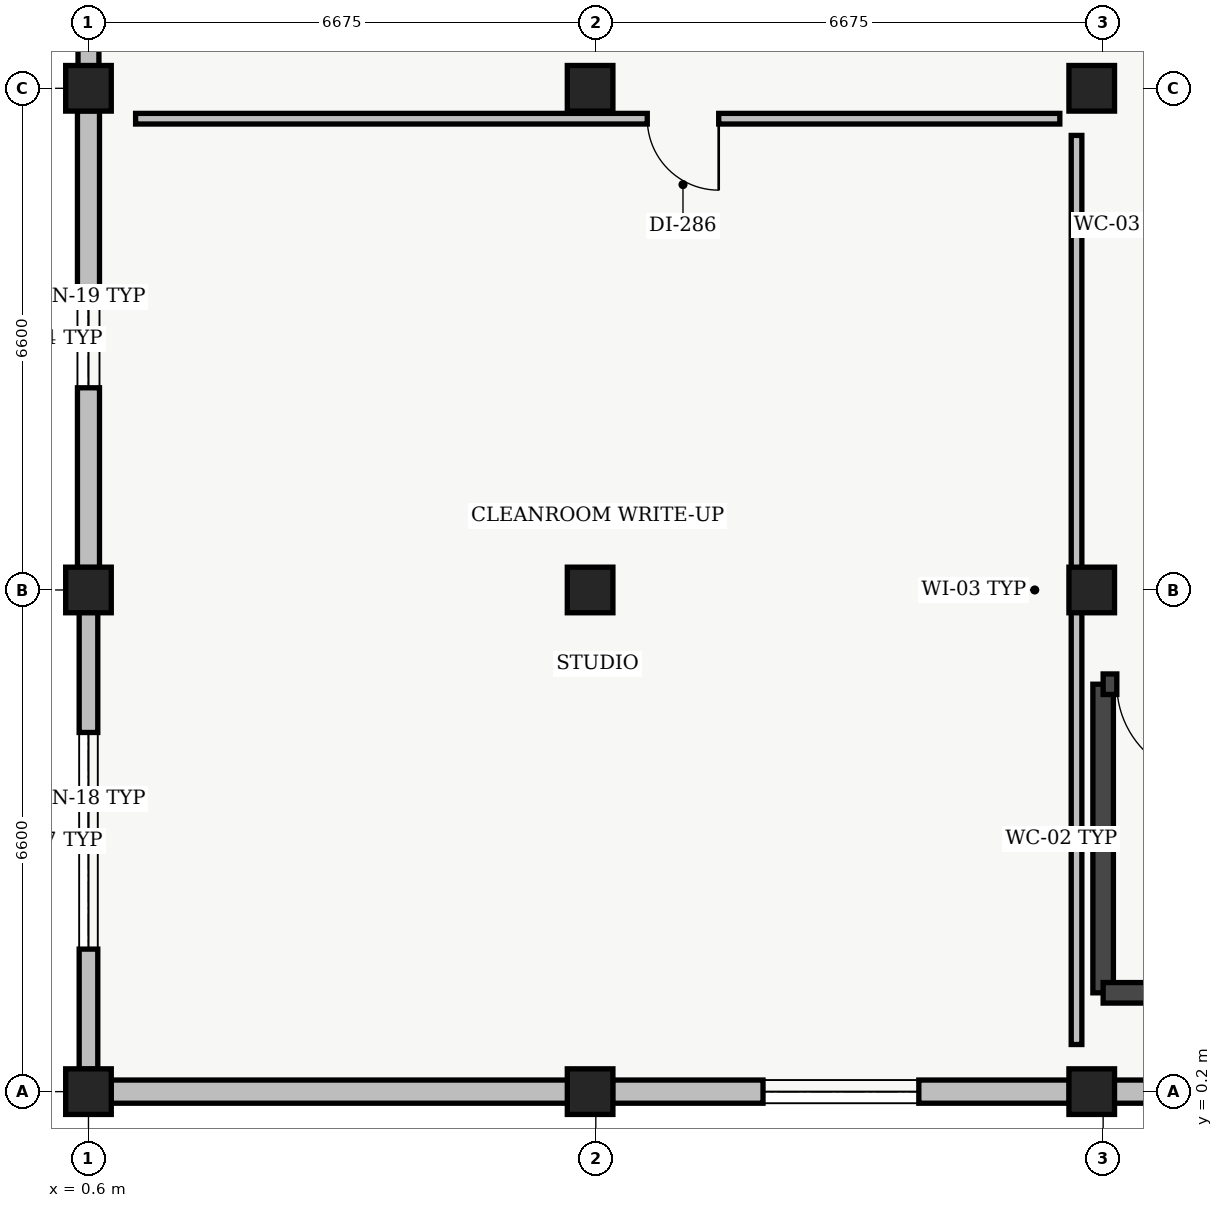
"""IFC4 building model, lengths in metres.
Left out: names, types, materials, properties, quantities, classifications, styles, units other than length and angle.
Written with IfcOpenShell. Run it as: python <this file> out.ifc"""

import sys

from ifc_helpers import new_model, si_unit, direction, frame, frame_2d, origin, origin_2d, place, context, subcontext, project, spatial, rectangle, extrude, element, fill, save


model = new_model("IFC4")
c1 = context("Model", 3, precision=1e-05, world=origin(), true_north=direction((0.0, 1.0)))
c2 = subcontext(c1, "Body", "Model", "MODEL_VIEW")
j1 = project(units=[si_unit("LENGTHUNIT", "METRE"), si_unit("PLANEANGLEUNIT", "RADIAN")], contexts=[c1])
p1 = place(None, origin())
s1 = spatial("IfcSite", under=j1, at=p1, CompositionType="ELEMENT")
p2 = place(p1, origin())
s2 = spatial("IfcBuilding", under=s1, at=p2, CompositionType="ELEMENT")
p3 = place(p2, frame((0.0, 0.0, 9.6)))
s3 = spatial("IfcBuildingStorey", under=s2, at=p3, CompositionType="ELEMENT", Elevation=9.6)
for number, where, z_axis, x_axis in (
    (1, (0.6, 0.2, 0.0), (0.0, 0.0, 1.0), (1.0, 0.0, 0.0)),
    (2, (0.6, 6.8, 0.0), (0.0, 0.0, 1.0), (1.0, 0.0, 0.0)),
    (3, (0.6, 13.4, 0.0), (0.0, 0.0, 1.0), (1.0, 0.0, 0.0)),
    (4, (7.2, 0.2, 0.0), (0.0, 0.0, 1.0), (1.0, 0.0, 0.0)),
    (5, (7.2, 6.8, 0.0), (0.0, 0.0, 1.0), (1.0, 0.0, 0.0)),
    (6, (7.2, 13.4, 0.0), (0.0, 0.0, 1.0), (1.0, 0.0, 0.0)),
    (7, (13.8, 0.2, 0.0), (0.0, 0.0, 1.0), (1.0, 0.0, 0.0)),
    (8, (13.8, 6.8, 0.0), (0.0, 0.0, 1.0), (1.0, 0.0, 0.0)),
    (9, (13.8, 13.4, 0.0), (0.0, 0.0, 1.0), (1.0, 0.0, 0.0)),
):
    element("IfcColumn", number, at=place(p3, frame(where, z_axis=z_axis, x_axis=x_axis)), inside=s3, PredefinedType="COLUMN", context=c2, shape_type="SweptSolid", body=[
        extrude(rectangle(XDim=0.6, YDim=0.6, at=origin_2d()), origin(), (0.0, 0.0, 1.0), 4.28),
    ])
p4 = place(p3, frame((0.6, 0.495, 0.0), z_axis=(0.0, 0.0, 1.0), x_axis=(0.0, 1.0, 0.0)))
e10 = element("IfcWall", 10, at=p4, inside=s3, PredefinedType="STANDARD", context=c2, shape_type="SweptSolid", body=[
    extrude(rectangle(XDim=6.01, YDim=0.245, at=frame_2d((3.005, 0.0))), origin(), (0.0, 0.0, 1.0), 3.815),
])
p5 = place(p4, frame((1.58, 0.0, 0.95)))
e11 = element("IfcOpeningElement", 11, at=p5, cuts=e10, PredefinedType="OPENING", context=c2, shape_type="SweptSolid", body=[
    extrude(rectangle(XDim=2.85, YDim=1.5, at=frame_2d((1.425, 0.75))), frame((0.0, 0.123, 0.0), z_axis=(0.0, -1.0, 0.0), x_axis=(1.0, 0.0, 0.0)), (0.0, 0.0, 1.0), 0.245),
])
p6 = place(p3, frame((0.6, 7.095, 0.0), z_axis=(0.0, 0.0, 1.0), x_axis=(0.0, 1.0, 0.0)))
e12 = element("IfcWall", 12, at=p6, inside=s3, PredefinedType="STANDARD", context=c2, shape_type="SweptSolid", body=[
    extrude(rectangle(XDim=6.01, YDim=0.29, at=frame_2d((3.005, 0.0))), origin(), (0.0, 0.0, 1.0), 3.815),
])
p7 = place(p6, frame((2.365, 0.0, 0.95)))
e13 = element("IfcOpeningElement", 13, at=p7, cuts=e12, PredefinedType="OPENING", context=c2, shape_type="SweptSolid", body=[
    extrude(rectangle(XDim=1.28, YDim=1.42, at=frame_2d((0.64, 0.71))), frame((0.0, 0.145, 0.0), z_axis=(0.0, -1.0, 0.0), x_axis=(1.0, 0.0, 0.0)), (0.0, 0.0, 1.0), 0.29),
])
p8 = place(p3, frame((0.6, 13.695, 0.0), z_axis=(0.0, 0.0, 1.0), x_axis=(0.0, 1.0, 0.0)))
e14 = element("IfcWall", 14, at=p8, inside=s3, PredefinedType="STANDARD", context=c2, shape_type="SweptSolid", body=[
    extrude(rectangle(XDim=6.01, YDim=0.275, at=frame_2d((3.005, 0.0))), origin(), (0.0, 0.0, 1.0), 3.815),
])
p9 = place(p8, frame((1.98, 0.0, 0.95)))
e15 = element("IfcOpeningElement", 15, at=p9, cuts=e14, PredefinedType="OPENING", context=c2, shape_type="SweptSolid", body=[
    extrude(rectangle(XDim=2.05, YDim=1.7, at=frame_2d((1.025, 0.85))), frame((0.0, 0.137, 0.0), z_axis=(0.0, -1.0, 0.0), x_axis=(1.0, 0.0, 0.0)), (0.0, 0.0, 1.0), 0.275),
])
p10 = place(p3, frame((20.105, 0.2, 0.0), z_axis=(0.0, 0.0, 1.0), x_axis=(-1.0, 0.0, 0.0)))
e16 = element("IfcWall", 16, at=p10, inside=s3, PredefinedType="STANDARD", context=c2, shape_type="SweptSolid", body=[
    extrude(rectangle(XDim=6.01, YDim=0.305, at=frame_2d((3.005, 0.0))), origin(), (0.0, 0.0, 1.0), 3.815),
])
p11 = place(p3, frame((13.505, 0.2, 0.0), z_axis=(0.0, 0.0, 1.0), x_axis=(-1.0, 0.0, 0.0)))
e17 = element("IfcWall", 17, at=p11, inside=s3, PredefinedType="STANDARD", context=c2, shape_type="SweptSolid", body=[
    extrude(rectangle(XDim=6.01, YDim=0.305, at=frame_2d((3.005, 0.0))), origin(), (0.0, 0.0, 1.0), 3.815),
])
p12 = place(p11, frame((1.98, 0.0, 0.95)))
e18 = element("IfcOpeningElement", 18, at=p12, cuts=e17, PredefinedType="OPENING", context=c2, shape_type="SweptSolid", body=[
    extrude(rectangle(XDim=2.05, YDim=1.7, at=frame_2d((1.025, 0.85))), frame((0.0, 0.152, 0.0), z_axis=(0.0, -1.0, 0.0), x_axis=(1.0, 0.0, 0.0)), (0.0, 0.0, 1.0), 0.305),
])
p13 = place(p3, frame((6.905, 0.2, 0.0), z_axis=(0.0, 0.0, 1.0), x_axis=(-1.0, 0.0, 0.0)))
e19 = element("IfcWall", 19, at=p13, inside=s3, PredefinedType="STANDARD", context=c2, shape_type="SweptSolid", body=[
    extrude(rectangle(XDim=6.01, YDim=0.305, at=frame_2d((3.005, 0.0))), origin(), (0.0, 0.0, 1.0), 3.815),
])
p14 = place(p3, frame((13.95, 1.5, 0.0), z_axis=(0.0, 0.0, 1.0), x_axis=(0.0, 1.0, 0.0)))
e20 = element("IfcWall", 20, at=p14, inside=s3, PredefinedType="SHEAR", context=c2, shape_type="SweptSolid", body=[
    extrude(rectangle(XDim=4.06, YDim=0.27, at=frame_2d((2.03, 0.0))), origin(), (0.0, 0.0, 1.0), 4.28),
])
p15 = place(p3, frame((13.95, 5.56, 0.0), z_axis=(0.0, 0.0, 1.0), x_axis=(1.0, 0.0, 0.0)))
e21 = element("IfcWall", 21, at=p15, inside=s3, PredefinedType="SHEAR", context=c2, shape_type="SweptSolid", body=[
    extrude(rectangle(XDim=7.47, YDim=0.27, at=frame_2d((3.735, 0.0))), origin(), (0.0, 0.0, 1.0), 4.28),
])
p16 = place(p15, frame((0.18, 0.0, 0.0)))
e22 = element("IfcOpeningElement", 22, at=p16, cuts=e21, PredefinedType="OPENING", context=c2, shape_type="SweptSolid", body=[
    extrude(rectangle(XDim=1.24, YDim=2.15, at=frame_2d((0.62, 1.075))), frame((0.0, 0.135, 0.0), z_axis=(0.0, -1.0, 0.0), x_axis=(1.0, 0.0, 0.0)), (0.0, 0.0, 1.0), 0.27),
])
p17 = place(p3, frame((21.42, 1.5, 0.0), z_axis=(0.0, 0.0, 1.0), x_axis=(-1.0, 0.0, 0.0)))
e23 = element("IfcWall", 23, at=p17, inside=s3, PredefinedType="SHEAR", context=c2, shape_type="SweptSolid", body=[
    extrude(rectangle(XDim=7.47, YDim=0.27, at=frame_2d((3.735, 0.0))), origin(), (0.0, 0.0, 1.0), 4.28),
])
p18 = place(p3, frame((13.6, 0.82, 0.0), z_axis=(0.0, 0.0, 1.0), x_axis=(0.0, 1.0, 0.0)))
e24 = element("IfcWall", 24, at=p18, inside=s3, PredefinedType="PARTITIONING", context=c2, shape_type="SweptSolid", body=[
    extrude(rectangle(XDim=11.96, YDim=0.14, at=frame_2d((5.98, 0.0))), origin(), (0.0, 0.0, 1.0), 3.615),
])
p19 = place(p3, frame((13.38, 13.0, 0.0), z_axis=(0.0, 0.0, 1.0), x_axis=(-1.0, 0.0, 0.0)))
e25 = element("IfcWall", 25, at=p19, inside=s3, PredefinedType="PARTITIONING", context=c2, shape_type="SweptSolid", body=[
    extrude(rectangle(XDim=12.16, YDim=0.14, at=frame_2d((6.08, 0.0))), origin(), (0.0, 0.0, 1.0), 3.95),
])
p20 = place(p19, frame((4.488, 0.0, 0.0)))
e26 = element("IfcOpeningElement", 26, at=p20, cuts=e25, PredefinedType="OPENING", context=c2, shape_type="SweptSolid", body=[
    extrude(rectangle(XDim=0.94, YDim=2.12, at=frame_2d((0.47, 1.06))), frame((0.0, 0.07, 0.0), z_axis=(0.0, -1.0, 0.0), x_axis=(1.0, 0.0, 0.0)), (0.0, 0.0, 1.0), 0.14),
])
p21 = place(p5, origin())
e27 = element("IfcWindow", 27, at=p21, inside=s3, PartitioningType="SINGLE_PANEL", PredefinedType="WINDOW", context=c2, shape_type="SweptSolid", body=[
    extrude(rectangle(XDim=2.85, YDim=1.5, at=frame_2d((1.425, 0.75))), frame((0.0, 0.03, 0.0), z_axis=(0.0, -1.0, 0.0), x_axis=(1.0, 0.0, 0.0)), (0.0, 0.0, 1.0), 0.06),
])
fill(e11, e27)
p22 = place(p7, origin())
e28 = element("IfcWindow", 28, at=p22, inside=s3, PartitioningType="SINGLE_PANEL", PredefinedType="WINDOW", context=c2, shape_type="SweptSolid", body=[
    extrude(rectangle(XDim=1.28, YDim=1.42, at=frame_2d((0.64, 0.71))), frame((0.0, 0.03, 0.0), z_axis=(0.0, -1.0, 0.0), x_axis=(1.0, 0.0, 0.0)), (0.0, 0.0, 1.0), 0.06),
])
fill(e13, e28)
p23 = place(p12, origin())
e29 = element("IfcWindow", 29, at=p23, inside=s3, PartitioningType="SINGLE_PANEL", PredefinedType="WINDOW", context=c2, shape_type="SweptSolid", body=[
    extrude(rectangle(XDim=2.05, YDim=1.7, at=frame_2d((1.025, 0.85))), frame((0.0, 0.03, 0.0), z_axis=(0.0, -1.0, 0.0), x_axis=(1.0, 0.0, 0.0)), (0.0, 0.0, 1.0), 0.06),
])
fill(e18, e29)
p24 = place(p16, origin())
e30 = element("IfcDoor", 30, at=p24, inside=s3, OperationType="SINGLE_SWING_RIGHT", PredefinedType="DOOR", context=c2, shape_type="SweptSolid", body=[
    extrude(rectangle(XDim=1.24, YDim=2.15, at=frame_2d((0.62, 1.075))), frame((0.0, 0.025, 0.0), z_axis=(0.0, -1.0, 0.0), x_axis=(1.0, 0.0, 0.0)), (0.0, 0.0, 1.0), 0.05),
])
fill(e22, e30)
p25 = place(p20, origin())
e31 = element("IfcDoor", 31, at=p25, inside=s3, OperationType="SINGLE_SWING_LEFT", PredefinedType="DOOR", context=c2, shape_type="SweptSolid", body=[
    extrude(rectangle(XDim=0.94, YDim=2.12, at=frame_2d((0.47, 1.06))), frame((0.0, 0.025, 0.0), z_axis=(0.0, -1.0, 0.0), x_axis=(1.0, 0.0, 0.0)), (0.0, 0.0, 1.0), 0.05),
])
fill(e26, e31)
save(model, sys.argv[1])
